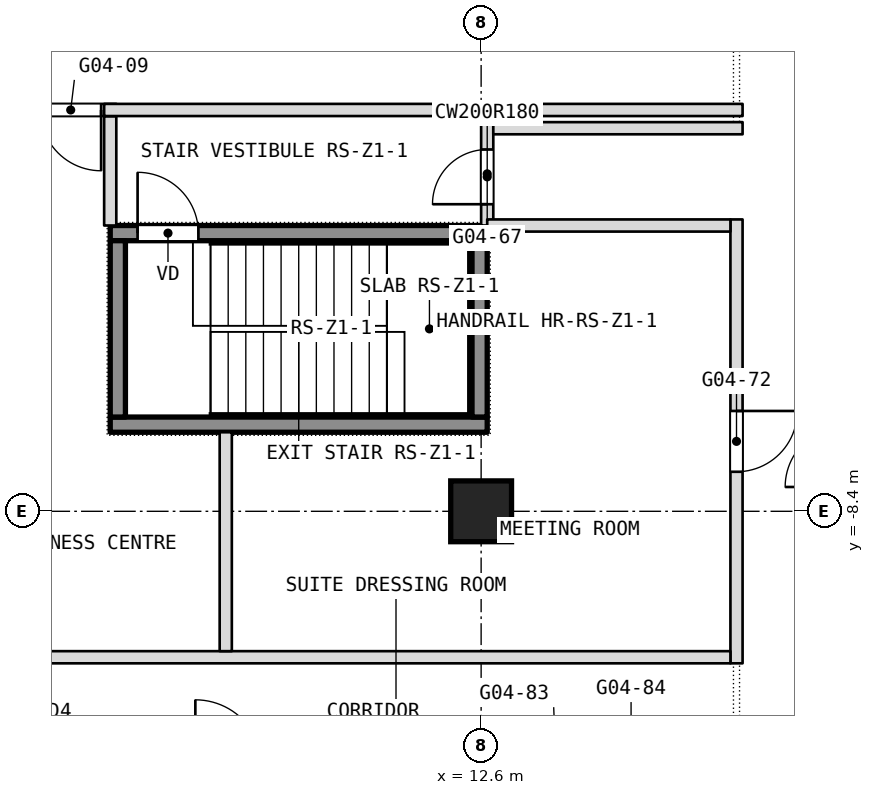
"""IFC4 building model, lengths in metres.
Left out: names, types, materials, properties, quantities, classifications, styles, units other than length and angle.
Written with IfcOpenShell. Run it as: python <this file> out.ifc"""

import sys

from ifc_helpers import new_model, si_unit, direction, frame, frame_2d, origin, origin_2d, place, context, subcontext, project, spatial, rectangle, extrude, element, fill, save


model = new_model("IFC4")
c1 = context("Model", 3, precision=1e-05, world=origin(), true_north=direction((0.0, 1.0)))
c2 = subcontext(c1, "Body", "Model", "MODEL_VIEW")
j1 = project(units=[si_unit("LENGTHUNIT", "METRE"), si_unit("PLANEANGLEUNIT", "RADIAN")], contexts=[c1])
p1 = place(None, origin())
s1 = spatial("IfcSite", under=j1, at=p1, CompositionType="ELEMENT")
p2 = place(p1, origin())
s2 = spatial("IfcBuilding", under=s1, at=p2, CompositionType="ELEMENT")
p3 = place(p2, frame((0.0, 0.0, 54.5)))
s3 = spatial("IfcBuildingStorey", under=s2, at=p3, CompositionType="ELEMENT", Elevation=54.5)
p4 = place(p3, frame((12.6, -8.4, 0.0), z_axis=(0.0, 0.0, 1.0), x_axis=(1.0, 0.0, 0.0)))
e1 = element("IfcColumn", 1, at=p4, inside=s3, PredefinedType="COLUMN", context=c2, shape_type="SweptSolid", body=[
    extrude(rectangle(XDim=1.0, YDim=1.0, at=origin_2d()), origin(), (0.0, 0.0, 1.0), 3.6),
])
p5 = place(p3, frame((16.8, -10.9, 0.0), z_axis=(0.0, 0.0, 1.0), x_axis=(0.0, 1.0, 0.0)))
e2 = element("IfcWall", 2, at=p5, inside=s3, PredefinedType="PARTITIONING", context=c2, shape_type="SweptSolid", body=[
    extrude(rectangle(XDim=7.3, YDim=0.2, at=frame_2d((3.65, 0.0))), origin(), (0.0, 0.0, 1.0), 3.34),
])
p6 = place(p5, frame((3.15, 0.0, 0.0)))
e3 = element("IfcOpeningElement", 3, at=p6, cuts=e2, PredefinedType="OPENING", context=c2, shape_type="SweptSolid", body=[
    extrude(rectangle(XDim=1.0, YDim=2.1, at=frame_2d((0.5, 1.05))), frame((0.0, 0.1, 0.0), z_axis=(0.0, -1.0, 0.0), x_axis=(1.0, 0.0, 0.0)), (0.0, 0.0, 1.0), 0.2),
])
p7 = place(p3, frame((12.7, -3.7, 0.0), z_axis=(0.0, 0.0, 1.0), x_axis=(0.0, 1.0, 0.0)))
e4 = element("IfcWall", 4, at=p7, inside=s3, PredefinedType="PARTITIONING", context=c2, shape_type="SweptSolid", body=[
    extrude(rectangle(XDim=1.7, YDim=0.2, at=frame_2d((0.85, 0.0))), origin(), (0.0, 0.0, 1.0), 3.34),
])
p8 = place(p7, frame((0.35, 0.0, 0.0)))
e5 = element("IfcOpeningElement", 5, at=p8, cuts=e4, PredefinedType="OPENING", context=c2, shape_type="SweptSolid", body=[
    extrude(rectangle(XDim=0.9, YDim=2.1, at=frame_2d((0.45, 1.05))), frame((0.0, 0.1, 0.0), z_axis=(0.0, -1.0, 0.0), x_axis=(1.0, 0.0, 0.0)), (0.0, 0.0, 1.0), 0.2),
])
p9 = place(p3, frame((-16.7, -10.8, 0.0), z_axis=(0.0, 0.0, 1.0), x_axis=(1.0, 0.0, 0.0)))
e6 = element("IfcWall", 6, at=p9, inside=s3, PredefinedType="PARTITIONING", context=c2, shape_type="SweptSolid", body=[
    extrude(rectangle(XDim=33.4, YDim=0.2, at=frame_2d((16.7, 0.0))), origin(), (0.0, 0.0, 1.0), 3.34),
])
p10 = place(p9, frame((5.7, 0.0, 0.0)))
e7 = element("IfcOpeningElement", 7, at=p10, cuts=e6, PredefinedType="OPENING", context=c2, shape_type="SweptSolid", body=[
    extrude(rectangle(XDim=1.0, YDim=2.1, at=frame_2d((0.5, 1.05))), frame((0.0, 0.1, 0.0), z_axis=(0.0, -1.0, 0.0), x_axis=(1.0, 0.0, 0.0)), (0.0, 0.0, 1.0), 0.2),
])
p11 = place(p9, frame((18.3, 0.0, 0.0)))
e8 = element("IfcOpeningElement", 8, at=p11, cuts=e6, PredefinedType="OPENING", context=c2, shape_type="SweptSolid", body=[
    extrude(rectangle(XDim=1.0, YDim=2.1, at=frame_2d((0.5, 1.05))), frame((0.0, 0.1, 0.0), z_axis=(0.0, -1.0, 0.0), x_axis=(1.0, 0.0, 0.0)), (0.0, 0.0, 1.0), 0.2),
])
p12 = place(p3, frame((8.4, -10.7, 0.0), z_axis=(0.0, 0.0, 1.0), x_axis=(0.0, 1.0, 0.0)))
e9 = element("IfcWall", 9, at=p12, inside=s3, PredefinedType="PARTITIONING", context=c2, shape_type="SweptSolid", body=[
    extrude(rectangle(XDim=3.6, YDim=0.2, at=frame_2d((1.8, 0.0))), origin(), (0.0, 0.0, 1.0), 3.34),
])
p13 = place(p3, frame((6.5, -3.7, 0.0), z_axis=(0.0, 0.0, 1.0), x_axis=(0.0, 1.0, 0.0)))
e10 = element("IfcWall", 10, at=p13, inside=s3, PredefinedType="PARTITIONING", context=c2, shape_type="SweptSolid", body=[
    extrude(rectangle(XDim=1.8, YDim=0.2, at=frame_2d((0.9, 0.0))), origin(), (0.0, 0.0, 1.0), 3.34),
])
p14 = place(p3, frame((12.7, -3.7, 0.0), z_axis=(0.0, 0.0, 1.0), x_axis=(1.0, 0.0, 0.0)))
e11 = element("IfcWall", 11, at=p14, inside=s3, PredefinedType="PARTITIONING", context=c2, shape_type="SweptSolid", body=[
    extrude(rectangle(XDim=4.0, YDim=0.2, at=frame_2d((2.0, 0.0))), origin(), (0.0, 0.0, 1.0), 3.34),
])
p15 = place(p3, frame((12.8, -2.1, 0.0), z_axis=(0.0, 0.0, 1.0), x_axis=(1.0, 0.0, 0.0)))
e12 = element("IfcWall", 12, at=p15, inside=s3, PredefinedType="PARTITIONING", context=c2, shape_type="SweptSolid", body=[
    extrude(rectangle(XDim=4.1, YDim=0.2, at=frame_2d((2.05, 0.0))), origin(), (0.0, 0.0, 1.0), 3.34),
])
p16 = place(p3, frame((-5.6, -1.8, 0.0), z_axis=(0.0, 0.0, 1.0), x_axis=(1.0, 0.0, 0.0)))
e13 = element("IfcWall", 13, at=p16, inside=s3, PredefinedType="PARTITIONING", context=c2, shape_type="SweptSolid", body=[
    extrude(rectangle(XDim=12.2, YDim=0.2, at=frame_2d((6.1, 0.0))), origin(), (0.0, 0.0, 1.0), 3.34),
])
p17 = place(p16, frame((0.25, 0.0, 0.0)))
e14 = element("IfcOpeningElement", 14, at=p17, cuts=e13, PredefinedType="OPENING", context=c2, shape_type="SweptSolid", body=[
    extrude(rectangle(XDim=1.0, YDim=2.1, at=frame_2d((0.5, 1.05))), frame((0.0, 0.1, 0.0), z_axis=(0.0, -1.0, 0.0), x_axis=(1.0, 0.0, 0.0)), (0.0, 0.0, 1.0), 0.2),
])
p18 = place(p16, frame((3.0, 0.0, 0.0)))
e15 = element("IfcOpeningElement", 15, at=p18, cuts=e13, PredefinedType="OPENING", context=c2, shape_type="SweptSolid", body=[
    extrude(rectangle(XDim=1.0, YDim=2.1, at=frame_2d((0.5, 1.05))), frame((0.0, 0.1, 0.0), z_axis=(0.0, -1.0, 0.0), x_axis=(1.0, 0.0, 0.0)), (0.0, 0.0, 1.0), 0.2),
])
p19 = place(p16, frame((10.95, 0.0, 0.0)))
e16 = element("IfcOpeningElement", 16, at=p19, cuts=e13, PredefinedType="OPENING", context=c2, shape_type="SweptSolid", body=[
    extrude(rectangle(XDim=1.0, YDim=2.1, at=frame_2d((0.5, 1.05))), frame((0.0, 0.1, 0.0), z_axis=(0.0, -1.0, 0.0), x_axis=(1.0, 0.0, 0.0)), (0.0, 0.0, 1.0), 0.2),
])
p20 = place(p16, frame((7.2, 0.0, 0.0)))
e17 = element("IfcOpeningElement", 17, at=p20, cuts=e13, PredefinedType="OPENING", context=c2, shape_type="SweptSolid", body=[
    extrude(rectangle(XDim=1.0, YDim=2.1, at=frame_2d((0.5, 1.05))), frame((0.0, 0.1, 0.0), z_axis=(0.0, -1.0, 0.0), x_axis=(1.0, 0.0, 0.0)), (0.0, 0.0, 1.0), 0.2),
])
p21 = place(p3, frame((6.4, -1.8, 0.0), z_axis=(0.0, 0.0, 1.0), x_axis=(1.0, 0.0, 0.0)))
e18 = element("IfcWall", 18, at=p21, inside=s3, PredefinedType="PARTITIONING", context=c2, shape_type="SweptSolid", body=[
    extrude(rectangle(XDim=10.5, YDim=0.2, at=frame_2d((5.25, 0.0))), origin(), (0.0, 0.0, 1.0), 3.34),
])
p22 = place(p3, frame((6.5, -6.975, 0.1), z_axis=(0.0, 0.0, 1.0), x_axis=(1.0, 0.0, 0.0)))
e19 = element("IfcWall", 19, at=p22, inside=s3, PredefinedType="SHEAR", context=c2, shape_type="SweptSolid", body=[
    extrude(rectangle(XDim=6.2, YDim=0.25, at=frame_2d((3.1, 0.0))), origin(), (0.0, 0.0, 1.0), 3.6),
])
p23 = place(p3, frame((6.5, -3.825, 0.1), z_axis=(0.0, 0.0, 1.0), x_axis=(1.0, 0.0, 0.0)))
e20 = element("IfcWall", 20, at=p23, inside=s3, PredefinedType="SHEAR", context=c2, shape_type="SweptSolid", body=[
    extrude(rectangle(XDim=6.2, YDim=0.25, at=frame_2d((3.1, 0.0))), origin(), (0.0, 0.0, 1.0), 3.6),
])
p24 = place(p23, frame((0.45, 0.0, 0.0)))
e21 = element("IfcOpeningElement", 21, at=p24, cuts=e20, PredefinedType="OPENING", context=c2, shape_type="SweptSolid", body=[
    extrude(rectangle(XDim=1.0, YDim=2.1, at=frame_2d((0.5, 1.05))), frame((0.0, 0.125, 0.0), z_axis=(0.0, -1.0, 0.0), x_axis=(1.0, 0.0, 0.0)), (0.0, 0.0, 1.0), 0.25),
])
for number, where, z_axis, x_axis in (
    (22, (6.625, -6.85, 0.1), (0.0, 0.0, 1.0), (0.0, 1.0, 0.0)),
    (23, (12.575, -6.85, 0.1), (0.0, 0.0, 1.0), (0.0, 1.0, 0.0)),
):
    element("IfcWall", number, at=place(p3, frame(where, z_axis=z_axis, x_axis=x_axis)), inside=s3, PredefinedType="SHEAR", context=c2, shape_type="SweptSolid", body=[
        extrude(rectangle(XDim=2.9, YDim=0.25, at=frame_2d((1.45, 0.0))), origin(), (0.0, 0.0, 1.0), 3.6),
    ])
p25 = place(p6, origin())
e24 = element("IfcDoor", 24, at=p25, inside=s3, OperationType="SINGLE_SWING_RIGHT", PredefinedType="DOOR", context=c2, shape_type="SweptSolid", body=[
    extrude(rectangle(XDim=1.0, YDim=2.1, at=frame_2d((0.5, 1.05))), frame((0.0, 0.025, 0.0), z_axis=(0.0, -1.0, 0.0), x_axis=(1.0, 0.0, 0.0)), (0.0, 0.0, 1.0), 0.05),
])
fill(e3, e24)
p26 = place(p8, origin())
e25 = element("IfcDoor", 25, at=p26, inside=s3, OperationType="SINGLE_SWING_RIGHT", PredefinedType="DOOR", context=c2, shape_type="SweptSolid", body=[
    extrude(rectangle(XDim=0.9, YDim=2.1, at=frame_2d((0.45, 1.05))), frame((0.0, 0.025, 0.0), z_axis=(0.0, -1.0, 0.0), x_axis=(1.0, 0.0, 0.0)), (0.0, 0.0, 1.0), 0.05),
])
fill(e5, e25)
p27 = place(p19, origin())
e26 = element("IfcDoor", 26, at=p27, inside=s3, OperationType="SINGLE_SWING_RIGHT", PredefinedType="DOOR", context=c2, shape_type="SweptSolid", body=[
    extrude(rectangle(XDim=1.0, YDim=2.1, at=frame_2d((0.5, 1.05))), frame((0.0, 0.025, 0.0), z_axis=(0.0, -1.0, 0.0), x_axis=(1.0, 0.0, 0.0)), (0.0, 0.0, 1.0), 0.05),
])
fill(e16, e26)
p28 = place(p24, origin())
e27 = element("IfcDoor", 27, at=p28, inside=s3, OperationType="SINGLE_SWING_LEFT", PredefinedType="DOOR", context=c2, shape_type="SweptSolid", body=[
    extrude(rectangle(XDim=1.0, YDim=2.1, at=frame_2d((0.5, 1.05))), frame((0.0, 0.025, 0.0), z_axis=(0.0, -1.0, 0.0), x_axis=(1.0, 0.0, 0.0)), (0.0, 0.0, 1.0), 0.05),
])
fill(e21, e27)
save(model, sys.argv[1])
